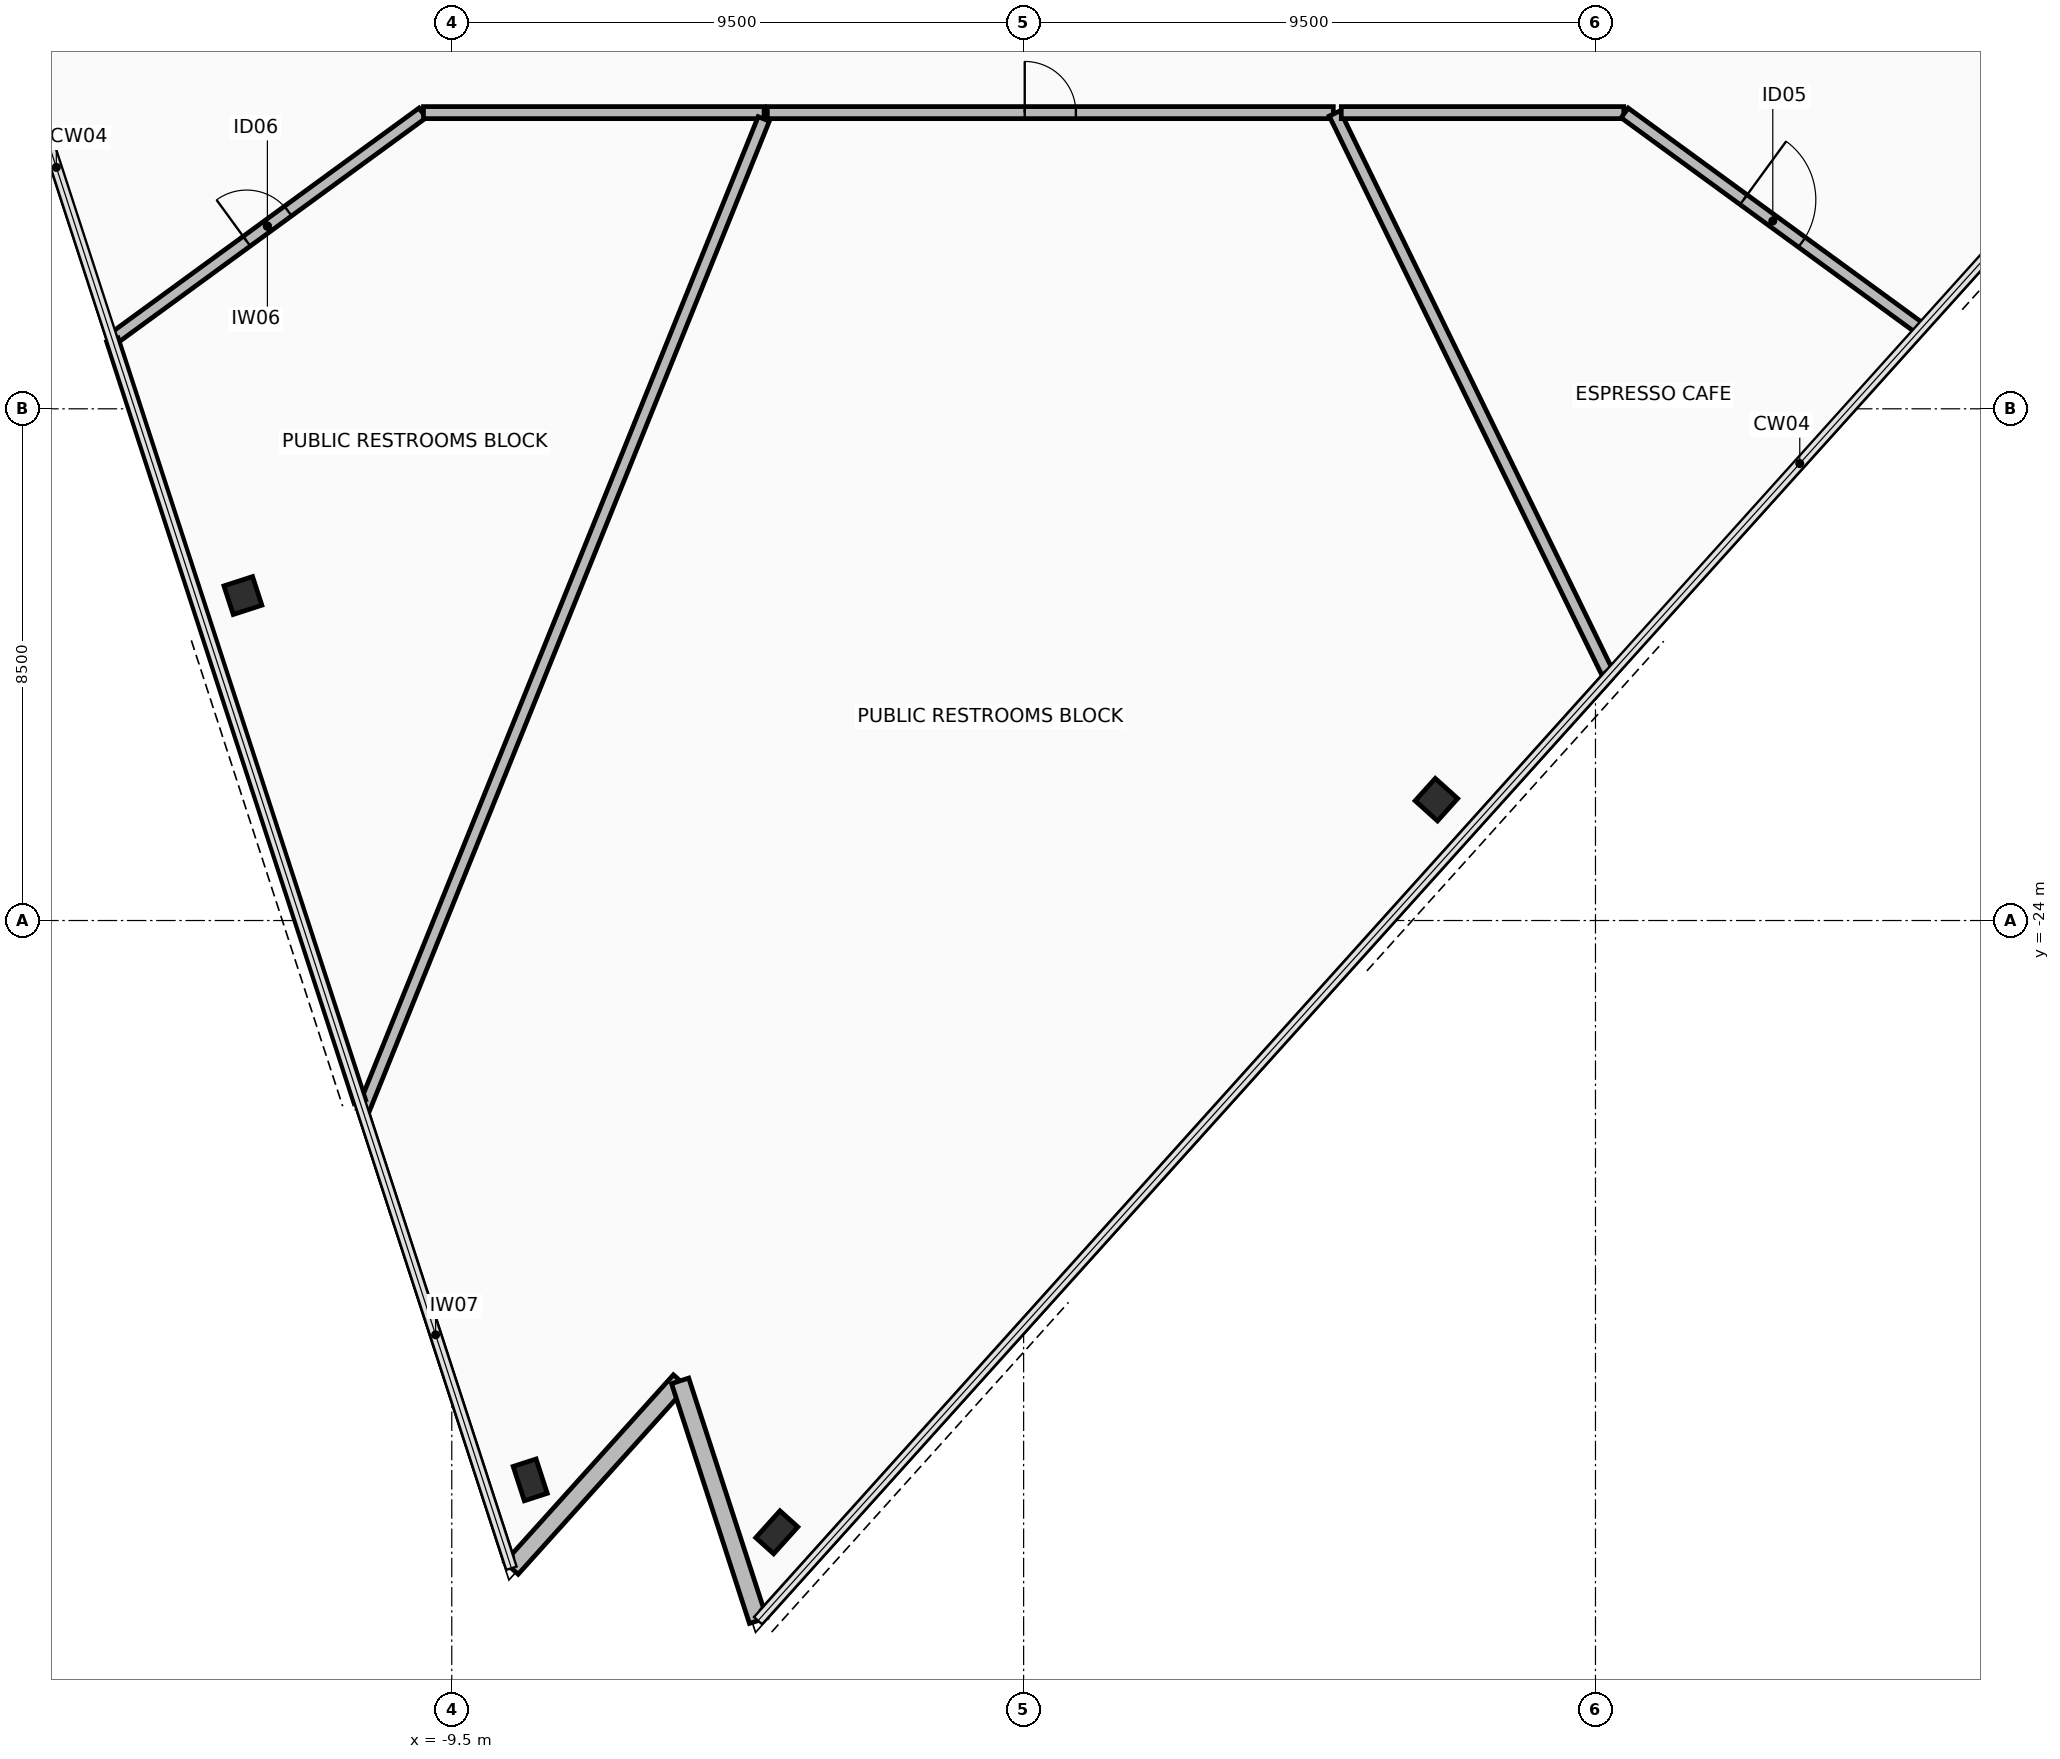
"""IFC4 building model, lengths in metres.
Left out: names, types, materials, properties, quantities, classifications, styles, units other than length and angle.
Written with IfcOpenShell. Run it as: python <this file> out.ifc"""

import sys

from ifc_helpers import new_model, si_unit, direction, frame, frame_2d, origin, origin_2d, place, context, subcontext, project, spatial, rectangle, hollow_rectangle, extrude, element, fill, save


model = new_model("IFC4")
c1 = context("Model", 3, precision=1e-05, world=origin(), true_north=direction((0.0, 1.0)))
c2 = subcontext(c1, "Body", "Model", "MODEL_VIEW")
j1 = project(units=[si_unit("LENGTHUNIT", "METRE"), si_unit("PLANEANGLEUNIT", "RADIAN")], contexts=[c1])
p1 = place(None, origin())
s1 = spatial("IfcSite", under=j1, at=p1, CompositionType="ELEMENT")
p2 = place(p1, origin())
s2 = spatial("IfcBuilding", under=s1, at=p2, CompositionType="ELEMENT")
p3 = place(p2, frame((0.0, 0.0, 196.85)))
s3 = spatial("IfcBuildingStorey", under=s2, at=p3, CompositionType="ELEMENT", Elevation=196.85)
p4 = place(p3, frame((-12.97, -18.602, 0.0), z_axis=(0.0, 0.0, 1.0), x_axis=(-0.309016994375, 0.951056516295, 0.0)))
e1 = element("IfcColumn", 1, at=p4, inside=s3, PredefinedType="COLUMN", context=c2, shape_type="SweptSolid", body=[
    extrude(hollow_rectangle(XDim=0.5, YDim=0.5, WallThickness=0.032, at=origin_2d()), origin(), (0.0, 0.0, 1.0), 3.6),
])
for number, where, z_axis, x_axis in (
    (2, (-8.197, -33.292, 0.0), (0.0, 0.0, 1.0), (-0.309, 0.951, 0.0)),
    (3, (-4.1, -34.162, 0.0), (0.0, 0.0, 1.0), (0.669, 0.743, 0.0)),
):
    element("IfcColumn", number, at=place(p3, frame(where, z_axis=z_axis, x_axis=x_axis)), inside=s3, PredefinedType="COLUMN", context=c2, shape_type="SweptSolid", body=[
        extrude(hollow_rectangle(XDim=0.4, YDim=0.6, WallThickness=0.03, at=origin_2d()), origin(), (0.0, 0.0, 1.0), 3.6),
    ])
p5 = place(p3, frame((6.857, -21.992, -0.19), z_axis=(0.0, 0.0, 1.0), x_axis=(0.669130606359, 0.743144825477, 0.0)))
e4 = element("IfcColumn", 4, at=p5, inside=s3, PredefinedType="COLUMN", context=c2, shape_type="SweptSolid", body=[
    extrude(hollow_rectangle(XDim=0.5, YDim=0.5, WallThickness=0.032, at=origin_2d()), origin(), (0.0, 0.0, 1.0), 3.79),
])
p6 = place(p3, frame((-8.509, -34.759, 0.0), z_axis=(0.0, 0.0, 1.0), x_axis=(0.669151507466, 0.743126005504, 0.0)))
e5 = element("IfcWall", 5, at=p6, inside=s3, PredefinedType="STANDARD", context=c2, shape_type="SweptSolid", body=[
    extrude(rectangle(XDim=4.188, YDim=0.3, at=frame_2d((2.094, 0.0))), origin(), (0.0, 0.0, 1.0), 2.715),
])
p7 = place(p3, frame((-5.706, -31.646, 0.0), z_axis=(0.0, 0.0, 1.0), x_axis=(0.309030708092, -0.951052060329, 0.0)))
e6 = element("IfcWall", 6, at=p7, inside=s3, PredefinedType="STANDARD", context=c2, shape_type="SweptSolid", body=[
    extrude(rectangle(XDim=4.188, YDim=0.3, at=frame_2d((2.094, 0.0))), origin(), (0.0, 0.0, 1.0), 2.715),
])
p8 = place(p3, frame((-15.141, -14.347, 0.0), z_axis=(0.0, 0.0, 1.0), x_axis=(0.807843616105, 0.589396888284, 0.0)))
e7 = element("IfcWall", 7, at=p8, inside=s3, PredefinedType="PARTITIONING", context=c2, shape_type="SweptSolid", body=[
    extrude(rectangle(XDim=6.383, YDim=0.2, at=frame_2d((3.191, 0.0))), origin(), (0.0, 0.0, 1.0), 2.715),
])
p9 = place(p8, frame((2.766, 0.0, 0.0)))
e8 = element("IfcOpeningElement", 8, at=p9, cuts=e7, PredefinedType="OPENING", context=c2, shape_type="SweptSolid", body=[
    extrude(rectangle(XDim=0.85, YDim=2.1, at=frame_2d((0.425, 1.05))), frame((0.0, 0.11, 0.0), z_axis=(0.0, -1.0, 0.0), x_axis=(1.0, 0.0, 0.0)), (0.0, 0.0, 1.0), 0.22),
])
p10 = place(p3, frame((-9.97, -10.58, 0.0), z_axis=(0.0, 0.0, 1.0), x_axis=(1.0, 0.0, 0.0)))
e9 = element("IfcWall", 9, at=p10, inside=s3, PredefinedType="PARTITIONING", context=c2, shape_type="SweptSolid", body=[
    extrude(rectangle(XDim=5.658, YDim=0.2, at=frame_2d((2.829, 0.0))), origin(), (0.0, 0.0, 1.0), 2.865),
])
p11 = place(p3, frame((-4.317, -10.685, 0.0), z_axis=(0.0, 0.0, 1.0), x_axis=(-0.374604298034, -0.927184781958, 0.0)))
e10 = element("IfcWall", 10, at=p11, inside=s3, PredefinedType="PARTITIONING", context=c2, shape_type="SweptSolid", body=[
    extrude(rectangle(XDim=17.775, YDim=0.2, at=frame_2d((8.888, 0.0))), origin(), (0.0, 0.0, 1.0), 2.715),
])
p12 = place(p3, frame((-11.026, -27.011, 0.0), z_axis=(0.0, 0.0, 1.0), x_axis=(-0.309025926892, 0.951053613898, 0.0)))
e11 = element("IfcWall", 11, at=p12, inside=s3, PredefinedType="PARTITIONING", context=c2, shape_type="SweptSolid", body=[
    extrude(rectangle(XDim=13.309, YDim=0.2, at=frame_2d((6.654, 0.0))), origin(), (0.0, 0.0, 1.0), 3.42),
])
p13 = place(p3, frame((-8.564, -34.588, 0.0), z_axis=(0.0, 0.0, 1.0), x_axis=(-0.309021628398, 0.951055010597, 0.0)))
e12 = element("IfcWall", 12, at=p13, inside=s3, PredefinedType="PARTITIONING", context=c2, shape_type="SweptSolid", body=[
    extrude(rectangle(XDim=7.795, YDim=0.15, at=frame_2d((3.898, 0.0))), origin(), (0.0, 0.0, 1.0), 3.42),
])
p14 = place(p3, frame((-4.258, -10.58, 0.0), z_axis=(0.0, 0.0, 1.0), x_axis=(1.0, 0.0, 0.0)))
e13 = element("IfcWall", 13, at=p14, inside=s3, PredefinedType="PARTITIONING", context=c2, shape_type="SweptSolid", body=[
    extrude(rectangle(XDim=9.402, YDim=0.2, at=frame_2d((4.701, 0.0))), origin(), (0.0, 0.0, 1.0), 2.865),
])
p15 = place(p14, frame((4.276, 0.0, 0.0)))
e14 = element("IfcOpeningElement", 14, at=p15, cuts=e13, PredefinedType="OPENING", context=c2, shape_type="SweptSolid", body=[
    extrude(rectangle(XDim=0.85, YDim=2.1, at=frame_2d((0.425, 1.05))), frame((0.0, 0.11, 0.0), z_axis=(0.0, -1.0, 0.0), x_axis=(1.0, 0.0, 0.0)), (0.0, 0.0, 1.0), 0.22),
])
p16 = place(p3, frame((5.167, -10.594, 0.0), z_axis=(0.0, 0.0, 1.0), x_axis=(0.438370303352, -0.89879445767, 0.0)))
e15 = element("IfcWall", 15, at=p16, inside=s3, PredefinedType="PARTITIONING", context=c2, shape_type="SweptSolid", body=[
    extrude(rectangle(XDim=10.373, YDim=0.2, at=frame_2d((5.187, 0.0))), origin(), (0.0, 0.0, 1.0), 2.715),
])
p17 = place(p3, frame((9.71, -19.945, 0.0), z_axis=(0.0, 0.0, 1.0), x_axis=(-0.669125853899, -0.743149104584, 0.0)))
e16 = element("IfcWall", 16, at=p17, inside=s3, PredefinedType="PARTITIONING", context=c2, shape_type="SweptSolid", body=[
    extrude(rectangle(XDim=20.927, YDim=0.15, at=frame_2d((10.463, 0.0))), origin(), (0.0, 0.0, 1.0), 3.42),
])
p18 = place(p3, frame((5.277, -10.58, 0.0), z_axis=(0.0, 0.0, 1.0), x_axis=(1.0, 0.0, 0.0)))
e17 = element("IfcWall", 17, at=p18, inside=s3, PredefinedType="PARTITIONING", context=c2, shape_type="SweptSolid", body=[
    extrude(rectangle(XDim=4.693, YDim=0.2, at=frame_2d((2.346, 0.0))), origin(), (0.0, 0.0, 1.0), 2.865),
])
p19 = place(p3, frame((9.985, -10.585, 0.0), z_axis=(0.0, 0.0, 1.0), x_axis=(0.807842527243, -0.589398380705, 0.0)))
e18 = element("IfcWall", 18, at=p19, inside=s3, PredefinedType="PARTITIONING", context=c2, shape_type="SweptSolid", body=[
    extrude(rectangle(XDim=6.091, YDim=0.2, at=frame_2d((3.045, 0.0))), origin(), (0.0, 0.0, 1.0), 2.715),
])
p20 = place(p19, frame((2.446, 0.0, 0.0)))
e19 = element("IfcOpeningElement", 19, at=p20, cuts=e18, PredefinedType="OPENING", context=c2, shape_type="SweptSolid", body=[
    extrude(rectangle(XDim=1.2, YDim=2.15, at=frame_2d((0.6, 1.075))), frame((0.0, 0.11, 0.0), z_axis=(0.0, -1.0, 0.0), x_axis=(1.0, 0.0, 0.0)), (0.0, 0.0, 1.0), 0.22),
])
p21 = place(p9, origin())
e20 = element("IfcDoor", 20, at=p21, inside=s3, OperationType="SINGLE_SWING_RIGHT", PredefinedType="DOOR", context=c2, shape_type="SweptSolid", body=[
    extrude(rectangle(XDim=0.85, YDim=2.1, at=frame_2d((0.425, 1.05))), frame((0.0, 0.025, 0.0), z_axis=(0.0, -1.0, 0.0), x_axis=(1.0, 0.0, 0.0)), (0.0, 0.0, 1.0), 0.05),
])
fill(e8, e20)
p22 = place(p15, origin())
e21 = element("IfcDoor", 21, at=p22, inside=s3, OperationType="SINGLE_SWING_RIGHT", PredefinedType="DOOR", context=c2, shape_type="SweptSolid", body=[
    extrude(rectangle(XDim=0.85, YDim=2.1, at=frame_2d((0.425, 1.05))), frame((0.0, 0.025, 0.0), z_axis=(0.0, -1.0, 0.0), x_axis=(1.0, 0.0, 0.0)), (0.0, 0.0, 1.0), 0.05),
])
fill(e14, e21)
p23 = place(p20, origin())
e22 = element("IfcDoor", 22, at=p23, inside=s3, OperationType="SINGLE_SWING_LEFT", PredefinedType="DOOR", context=c2, shape_type="SweptSolid", body=[
    extrude(rectangle(XDim=1.2, YDim=2.15, at=frame_2d((0.6, 1.075))), frame((0.0, 0.025, 0.0), z_axis=(0.0, -1.0, 0.0), x_axis=(1.0, 0.0, 0.0)), (0.0, 0.0, 1.0), 0.05),
])
fill(e19, e22)
save(model, sys.argv[1])
